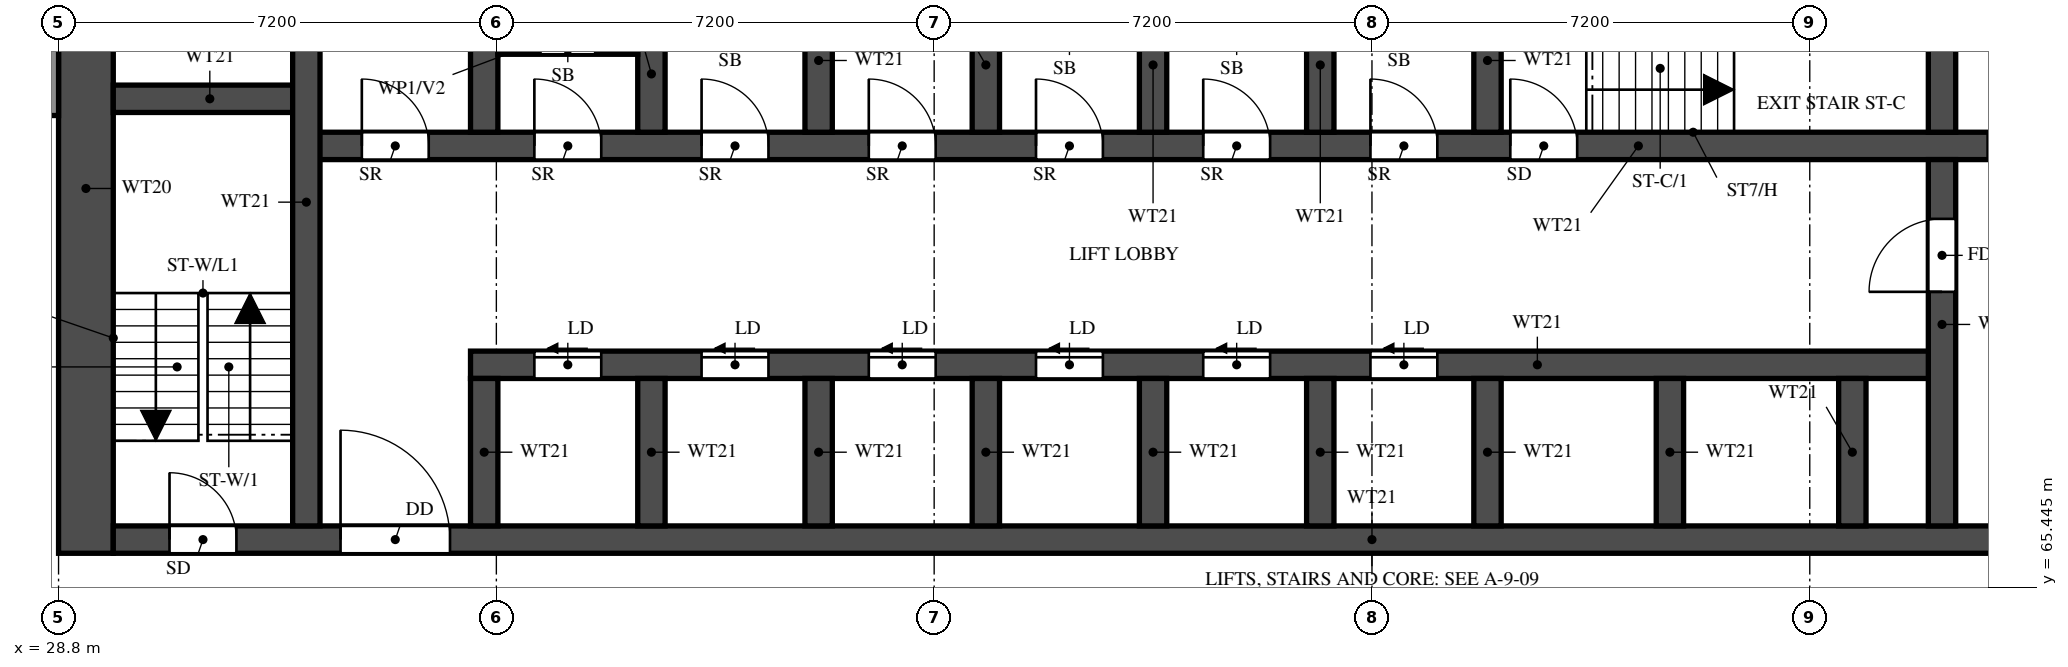
"""IFC4 building model, lengths in metres.
Left out: names, types, materials, properties, quantities, classifications, styles, units other than length and angle.
Written with IfcOpenShell. Run it as: python <this file> out.ifc"""

import sys

from ifc_helpers import new_model, si_unit, direction, frame, frame_2d, origin, place, context, subcontext, project, spatial, rectangle, extrude, element, fill, save


model = new_model("IFC4")
c1 = context("Model", 3, precision=1e-05, world=origin(), true_north=direction((0.0, 1.0)))
c2 = subcontext(c1, "Body", "Model", "MODEL_VIEW")
j1 = project(units=[si_unit("LENGTHUNIT", "METRE"), si_unit("PLANEANGLEUNIT", "RADIAN")], contexts=[c1])
p1 = place(None, origin())
s1 = spatial("IfcSite", under=j1, at=p1, CompositionType="ELEMENT")
p2 = place(p1, origin())
s2 = spatial("IfcBuilding", under=s1, at=p2, CompositionType="ELEMENT")
p3 = place(p2, frame((0.0, 0.0, 48.0)))
s3 = spatial("IfcBuildingStorey", under=s2, at=p3, CompositionType="ELEMENT", Elevation=48.0)
p4 = place(p3, frame((29.25, 66.0, 0.0), z_axis=(0.0, 0.0, 1.0), x_axis=(0.0, 1.0, 0.0)))
e1 = element("IfcWall", 1, at=p4, inside=s3, PredefinedType="SHEAR", context=c2, shape_type="SweptSolid", body=[
    extrude(rectangle(XDim=12.0, YDim=0.9, at=frame_2d((6.0, 0.0))), origin(), (0.0, 0.0, 1.0), 3.18),
])
p5 = place(p3, frame((29.7, 66.225, 0.0), z_axis=(0.0, 0.0, 1.0), x_axis=(1.0, 0.0, 0.0)))
e2 = element("IfcWall", 2, at=p5, inside=s3, PredefinedType="SHEAR", context=c2, shape_type="SweptSolid", body=[
    extrude(rectangle(XDim=41.4, YDim=0.45, at=frame_2d((20.7, 0.0))), origin(), (0.0, 0.0, 1.0), 3.18),
])
p6 = place(p5, frame((0.925, 0.0, 0.0)))
e3 = element("IfcOpeningElement", 3, at=p6, cuts=e2, PredefinedType="OPENING", context=c2, shape_type="SweptSolid", body=[
    extrude(rectangle(XDim=1.1, YDim=2.1, at=frame_2d((0.55, 1.05))), frame((0.0, 0.235, 0.0), z_axis=(0.0, -1.0, 0.0), x_axis=(1.0, 0.0, 0.0)), (0.0, 0.0, 1.0), 0.47),
])
p7 = place(p5, frame((3.738, 0.0, 0.0)))
e4 = element("IfcOpeningElement", 4, at=p7, cuts=e2, PredefinedType="OPENING", context=c2, shape_type="SweptSolid", body=[
    extrude(rectangle(XDim=1.8, YDim=2.1, at=frame_2d((0.9, 1.05))), frame((0.0, 0.235, 0.0), z_axis=(0.0, -1.0, 0.0), x_axis=(1.0, 0.0, 0.0)), (0.0, 0.0, 1.0), 0.47),
])
p8 = place(p3, frame((35.575, 69.1, 0.0), z_axis=(0.0, 0.0, 1.0), x_axis=(1.0, 0.0, 0.0)))
e5 = element("IfcWall", 5, at=p8, inside=s3, PredefinedType="SHEAR", context=c2, shape_type="SweptSolid", body=[
    extrude(rectangle(XDim=24.2, YDim=0.45, at=frame_2d((12.1, 0.0))), origin(), (0.0, 0.0, 1.0), 3.18),
])
p9 = place(p8, frame((1.05, 0.0, 0.0)))
e6 = element("IfcOpeningElement", 6, at=p9, cuts=e5, PredefinedType="OPENING", context=c2, shape_type="SweptSolid", body=[
    extrude(rectangle(XDim=1.1, YDim=2.1, at=frame_2d((0.55, 1.05))), frame((0.0, 0.235, 0.0), z_axis=(0.0, -1.0, 0.0), x_axis=(1.0, 0.0, 0.0)), (0.0, 0.0, 1.0), 0.47),
])
p10 = place(p8, frame((3.8, 0.0, 0.0)))
e7 = element("IfcOpeningElement", 7, at=p10, cuts=e5, PredefinedType="OPENING", context=c2, shape_type="SweptSolid", body=[
    extrude(rectangle(XDim=1.1, YDim=2.1, at=frame_2d((0.55, 1.05))), frame((0.0, 0.235, 0.0), z_axis=(0.0, -1.0, 0.0), x_axis=(1.0, 0.0, 0.0)), (0.0, 0.0, 1.0), 0.47),
])
p11 = place(p8, frame((6.55, 0.0, 0.0)))
e8 = element("IfcOpeningElement", 8, at=p11, cuts=e5, PredefinedType="OPENING", context=c2, shape_type="SweptSolid", body=[
    extrude(rectangle(XDim=1.1, YDim=2.1, at=frame_2d((0.55, 1.05))), frame((0.0, 0.235, 0.0), z_axis=(0.0, -1.0, 0.0), x_axis=(1.0, 0.0, 0.0)), (0.0, 0.0, 1.0), 0.47),
])
p12 = place(p8, frame((9.3, 0.0, 0.0)))
e9 = element("IfcOpeningElement", 9, at=p12, cuts=e5, PredefinedType="OPENING", context=c2, shape_type="SweptSolid", body=[
    extrude(rectangle(XDim=1.1, YDim=2.1, at=frame_2d((0.55, 1.05))), frame((0.0, 0.235, 0.0), z_axis=(0.0, -1.0, 0.0), x_axis=(1.0, 0.0, 0.0)), (0.0, 0.0, 1.0), 0.47),
])
p13 = place(p8, frame((12.05, 0.0, 0.0)))
e10 = element("IfcOpeningElement", 10, at=p13, cuts=e5, PredefinedType="OPENING", context=c2, shape_type="SweptSolid", body=[
    extrude(rectangle(XDim=1.1, YDim=2.1, at=frame_2d((0.55, 1.05))), frame((0.0, 0.235, 0.0), z_axis=(0.0, -1.0, 0.0), x_axis=(1.0, 0.0, 0.0)), (0.0, 0.0, 1.0), 0.47),
])
p14 = place(p8, frame((14.8, 0.0, 0.0)))
e11 = element("IfcOpeningElement", 11, at=p14, cuts=e5, PredefinedType="OPENING", context=c2, shape_type="SweptSolid", body=[
    extrude(rectangle(XDim=1.1, YDim=2.1, at=frame_2d((0.55, 1.05))), frame((0.0, 0.235, 0.0), z_axis=(0.0, -1.0, 0.0), x_axis=(1.0, 0.0, 0.0)), (0.0, 0.0, 1.0), 0.47),
])
p15 = place(p3, frame((32.875, 72.7, 0.0), z_axis=(0.0, 0.0, 1.0), x_axis=(1.0, 0.0, 0.0)))
e12 = element("IfcWall", 12, at=p15, inside=s3, PredefinedType="SHEAR", context=c2, shape_type="SweptSolid", body=[
    extrude(rectangle(XDim=35.05, YDim=0.45, at=frame_2d((17.525, 0.0))), origin(), (0.0, 0.0, 1.0), 3.18),
])
p16 = place(p15, frame((19.8, 0.0, 0.0)))
e13 = element("IfcOpeningElement", 13, at=p16, cuts=e12, PredefinedType="OPENING", context=c2, shape_type="SweptSolid", body=[
    extrude(rectangle(XDim=1.1, YDim=2.1, at=frame_2d((0.55, 1.05))), frame((0.0, 0.235, 0.0), z_axis=(0.0, -1.0, 0.0), x_axis=(1.0, 0.0, 0.0)), (0.0, 0.0, 1.0), 0.47),
])
p17 = place(p15, frame((27.65, 0.0, 0.0)))
e14 = element("IfcOpeningElement", 14, at=p17, cuts=e12, PredefinedType="OPENING", context=c2, shape_type="SweptSolid", body=[
    extrude(rectangle(XDim=1.1, YDim=2.1, at=frame_2d((0.55, 1.05))), frame((0.0, 0.235, 0.0), z_axis=(0.0, -1.0, 0.0), x_axis=(1.0, 0.0, 0.0)), (0.0, 0.0, 1.0), 0.47),
])
p18 = place(p15, frame((30.25, 0.0, 0.0)))
e15 = element("IfcOpeningElement", 15, at=p18, cuts=e12, PredefinedType="OPENING", context=c2, shape_type="SweptSolid", body=[
    extrude(rectangle(XDim=1.1, YDim=2.1, at=frame_2d((0.55, 1.05))), frame((0.0, 0.235, 0.0), z_axis=(0.0, -1.0, 0.0), x_axis=(1.0, 0.0, 0.0)), (0.0, 0.0, 1.0), 0.47),
])
p19 = place(p15, frame((3.75, 0.0, 0.0)))
e16 = element("IfcOpeningElement", 16, at=p19, cuts=e12, PredefinedType="OPENING", context=c2, shape_type="SweptSolid", body=[
    extrude(rectangle(XDim=1.1, YDim=2.1, at=frame_2d((0.55, 1.05))), frame((0.0, 0.235, 0.0), z_axis=(0.0, -1.0, 0.0), x_axis=(1.0, 0.0, 0.0)), (0.0, 0.0, 1.0), 0.47),
])
p20 = place(p15, frame((6.5, 0.0, 0.0)))
e17 = element("IfcOpeningElement", 17, at=p20, cuts=e12, PredefinedType="OPENING", context=c2, shape_type="SweptSolid", body=[
    extrude(rectangle(XDim=1.1, YDim=2.1, at=frame_2d((0.55, 1.05))), frame((0.0, 0.235, 0.0), z_axis=(0.0, -1.0, 0.0), x_axis=(1.0, 0.0, 0.0)), (0.0, 0.0, 1.0), 0.47),
])
p21 = place(p15, frame((9.25, 0.0, 0.0)))
e18 = element("IfcOpeningElement", 18, at=p21, cuts=e12, PredefinedType="OPENING", context=c2, shape_type="SweptSolid", body=[
    extrude(rectangle(XDim=1.1, YDim=2.1, at=frame_2d((0.55, 1.05))), frame((0.0, 0.235, 0.0), z_axis=(0.0, -1.0, 0.0), x_axis=(1.0, 0.0, 0.0)), (0.0, 0.0, 1.0), 0.47),
])
p22 = place(p15, frame((12.0, 0.0, 0.0)))
e19 = element("IfcOpeningElement", 19, at=p22, cuts=e12, PredefinedType="OPENING", context=c2, shape_type="SweptSolid", body=[
    extrude(rectangle(XDim=1.1, YDim=2.1, at=frame_2d((0.55, 1.05))), frame((0.0, 0.235, 0.0), z_axis=(0.0, -1.0, 0.0), x_axis=(1.0, 0.0, 0.0)), (0.0, 0.0, 1.0), 0.47),
])
p23 = place(p15, frame((14.75, 0.0, 0.0)))
e20 = element("IfcOpeningElement", 20, at=p23, cuts=e12, PredefinedType="OPENING", context=c2, shape_type="SweptSolid", body=[
    extrude(rectangle(XDim=1.1, YDim=2.1, at=frame_2d((0.55, 1.05))), frame((0.0, 0.235, 0.0), z_axis=(0.0, -1.0, 0.0), x_axis=(1.0, 0.0, 0.0)), (0.0, 0.0, 1.0), 0.47),
])
p24 = place(p15, frame((17.5, 0.0, 0.0)))
e21 = element("IfcOpeningElement", 21, at=p24, cuts=e12, PredefinedType="OPENING", context=c2, shape_type="SweptSolid", body=[
    extrude(rectangle(XDim=1.1, YDim=2.1, at=frame_2d((0.55, 1.05))), frame((0.0, 0.235, 0.0), z_axis=(0.0, -1.0, 0.0), x_axis=(1.0, 0.0, 0.0)), (0.0, 0.0, 1.0), 0.47),
])
p25 = place(p15, frame((0.913, 0.0, 0.0)))
e22 = element("IfcOpeningElement", 22, at=p25, cuts=e12, PredefinedType="OPENING", context=c2, shape_type="SweptSolid", body=[
    extrude(rectangle(XDim=1.1, YDim=2.1, at=frame_2d((0.55, 1.05))), frame((0.0, 0.235, 0.0), z_axis=(0.0, -1.0, 0.0), x_axis=(1.0, 0.0, 0.0)), (0.0, 0.0, 1.0), 0.47),
])
p26 = place(p3, frame((29.7, 73.475, 0.0), z_axis=(0.0, 0.0, 1.0), x_axis=(1.0, 0.0, 0.0)))
e23 = element("IfcWall", 23, at=p26, inside=s3, PredefinedType="SHEAR", context=c2, shape_type="SweptSolid", body=[
    extrude(rectangle(XDim=3.175, YDim=0.45, at=frame_2d((1.587, 0.0))), origin(), (0.0, 0.0, 1.0), 3.18),
])
p27 = place(p3, frame((32.875, 66.45, 0.0), z_axis=(0.0, 0.0, 1.0), x_axis=(0.0, 1.0, 0.0)))
e24 = element("IfcWall", 24, at=p27, inside=s3, PredefinedType="SHEAR", context=c2, shape_type="SweptSolid", body=[
    extrude(rectangle(XDim=10.65, YDim=0.45, at=frame_2d((5.325, 0.0))), origin(), (0.0, 0.0, 1.0), 3.18),
])
p28 = place(p3, frame((59.775, 66.45, 0.0), z_axis=(0.0, 0.0, 1.0), x_axis=(0.0, 1.0, 0.0)))
e25 = element("IfcWall", 25, at=p28, inside=s3, PredefinedType="SHEAR", context=c2, shape_type="SweptSolid", body=[
    extrude(rectangle(XDim=6.025, YDim=0.45, at=frame_2d((3.013, 0.0))), origin(), (0.0, 0.0, 1.0), 3.18),
])
p29 = place(p28, frame((3.85, 0.0, 0.0)))
e26 = element("IfcOpeningElement", 26, at=p29, cuts=e25, PredefinedType="OPENING", context=c2, shape_type="SweptSolid", body=[
    extrude(rectangle(XDim=1.2, YDim=2.1, at=frame_2d((0.6, 1.05))), frame((0.0, 0.235, 0.0), z_axis=(0.0, -1.0, 0.0), x_axis=(1.0, 0.0, 0.0)), (0.0, 0.0, 1.0), 0.47),
])
p30 = place(p3, frame((59.775, 72.925, 0.0), z_axis=(0.0, 0.0, 1.0), x_axis=(0.0, 1.0, 0.0)))
e27 = element("IfcWall", 27, at=p30, inside=s3, PredefinedType="SHEAR", context=c2, shape_type="SweptSolid", body=[
    extrude(rectangle(XDim=2.95, YDim=0.45, at=frame_2d((1.475, 0.0))), origin(), (0.0, 0.0, 1.0), 3.18),
])
for number, where, z_axis, x_axis in (
    (28, (35.8, 66.45, 0.0), (0.0, 0.0, 1.0), (0.0, 1.0, 0.0)),
    (29, (38.55, 66.45, 0.0), (0.0, 0.0, 1.0), (0.0, 1.0, 0.0)),
    (30, (41.3, 66.45, 0.0), (0.0, 0.0, 1.0), (0.0, 1.0, 0.0)),
    (31, (44.05, 66.45, 0.0), (0.0, 0.0, 1.0), (0.0, 1.0, 0.0)),
    (32, (46.8, 66.45, 0.0), (0.0, 0.0, 1.0), (0.0, 1.0, 0.0)),
    (33, (49.55, 66.45, 0.0), (0.0, 0.0, 1.0), (0.0, 1.0, 0.0)),
    (34, (52.3, 66.45, 0.0), (0.0, 0.0, 1.0), (0.0, 1.0, 0.0)),
    (35, (55.3, 66.45, 0.0), (0.0, 0.0, 1.0), (0.0, 1.0, 0.0)),
    (36, (58.3, 66.45, 0.0), (0.0, 0.0, 1.0), (0.0, 1.0, 0.0)),
):
    element("IfcWall", number, at=place(p3, frame(where, z_axis=z_axis, x_axis=x_axis)), inside=s3, PredefinedType="SHEAR", context=c2, shape_type="SweptSolid", body=[
        extrude(rectangle(XDim=2.425, YDim=0.45, at=frame_2d((1.212, 0.0))), origin(), (0.0, 0.0, 1.0), 3.18),
    ])
for number, where, z_axis, x_axis in (
    (37, (35.8, 72.925, 0.0), (0.0, 0.0, 1.0), (0.0, 1.0, 0.0)),
    (38, (38.55, 72.925, 0.0), (0.0, 0.0, 1.0), (0.0, 1.0, 0.0)),
    (39, (41.3, 72.925, 0.0), (0.0, 0.0, 1.0), (0.0, 1.0, 0.0)),
    (40, (44.05, 72.925, 0.0), (0.0, 0.0, 1.0), (0.0, 1.0, 0.0)),
    (41, (46.8, 72.925, 0.0), (0.0, 0.0, 1.0), (0.0, 1.0, 0.0)),
    (42, (49.55, 72.925, 0.0), (0.0, 0.0, 1.0), (0.0, 1.0, 0.0)),
    (43, (52.3, 72.925, 0.0), (0.0, 0.0, 1.0), (0.0, 1.0, 0.0)),
):
    element("IfcWall", number, at=place(p3, frame(where, z_axis=z_axis, x_axis=x_axis)), inside=s3, PredefinedType="SHEAR", context=c2, shape_type="SweptSolid", body=[
        extrude(rectangle(XDim=2.95, YDim=0.45, at=frame_2d((1.475, 0.0))), origin(), (0.0, 0.0, 1.0), 3.18),
    ])
p31 = place(p3, frame((36.025, 74.282, 0.0), z_axis=(0.0, 0.0, 1.0), x_axis=(1.0, 0.0, 0.0)))
e44 = element("IfcWall", 44, at=p31, inside=s3, PredefinedType="PARTITIONING", context=c2, shape_type="SweptSolid", body=[
    extrude(rectangle(XDim=2.3, YDim=0.15, at=frame_2d((1.15, 0.0))), origin(), (0.0, 0.0, 1.0), 3.18),
])
p32 = place(p31, frame((0.7, 0.0, 0.0)))
e45 = element("IfcOpeningElement", 45, at=p32, cuts=e44, PredefinedType="OPENING", context=c2, shape_type="SweptSolid", body=[
    extrude(rectangle(XDim=0.9, YDim=2.1, at=frame_2d((0.45, 1.05))), frame((0.0, 0.085, 0.0), z_axis=(0.0, -1.0, 0.0), x_axis=(1.0, 0.0, 0.0)), (0.0, 0.0, 1.0), 0.17),
])
p33 = place(p3, frame((28.7, 73.2, 0.0), z_axis=(0.0, 0.0, 1.0), x_axis=(0.0, 1.0, 0.0)))
e46 = element("IfcWall", 46, at=p33, inside=s3, PredefinedType="SOLIDWALL", context=c2, shape_type="SweptSolid", body=[
    extrude(rectangle(XDim=4.8, YDim=0.2, at=frame_2d((2.4, 0.0))), origin(), (0.0, 0.0, 1.0), 3.18),
])
p34 = place(p6, origin())
e47 = element("IfcDoor", 47, at=p34, inside=s3, OperationType="SINGLE_SWING_LEFT", PredefinedType="DOOR", context=c2, shape_type="SweptSolid", body=[
    extrude(rectangle(XDim=1.1, YDim=2.1, at=frame_2d((0.55, 1.05))), frame((0.0, 0.025, 0.0), z_axis=(0.0, -1.0, 0.0), x_axis=(1.0, 0.0, 0.0)), (0.0, 0.0, 1.0), 0.05),
])
fill(e3, e47)
p35 = place(p16, origin())
e48 = element("IfcDoor", 48, at=p35, inside=s3, OperationType="SINGLE_SWING_LEFT", PredefinedType="DOOR", context=c2, shape_type="SweptSolid", body=[
    extrude(rectangle(XDim=1.1, YDim=2.1, at=frame_2d((0.55, 1.05))), frame((0.0, 0.025, 0.0), z_axis=(0.0, -1.0, 0.0), x_axis=(1.0, 0.0, 0.0)), (0.0, 0.0, 1.0), 0.05),
])
fill(e13, e48)
p36 = place(p7, origin())
e49 = element("IfcDoor", 49, at=p36, inside=s3, OperationType="DOUBLE_DOOR_SINGLE_SWING", PredefinedType="DOOR", context=c2, shape_type="SweptSolid", body=[
    extrude(rectangle(XDim=1.8, YDim=2.1, at=frame_2d((0.9, 1.05))), frame((0.0, 0.025, 0.0), z_axis=(0.0, -1.0, 0.0), x_axis=(1.0, 0.0, 0.0)), (0.0, 0.0, 1.0), 0.05),
])
fill(e4, e49)
p37 = place(p29, origin())
e50 = element("IfcDoor", 50, at=p37, inside=s3, OperationType="SINGLE_SWING_RIGHT", PredefinedType="DOOR", context=c2, shape_type="SweptSolid", body=[
    extrude(rectangle(XDim=1.2, YDim=2.1, at=frame_2d((0.6, 1.05))), frame((0.0, 0.025, 0.0), z_axis=(0.0, -1.0, 0.0), x_axis=(1.0, 0.0, 0.0)), (0.0, 0.0, 1.0), 0.05),
])
fill(e26, e50)
p38 = place(p17, origin())
e51 = element("IfcDoor", 51, at=p38, inside=s3, OperationType="SLIDING_TO_LEFT", PredefinedType="DOOR", context=c2, shape_type="SweptSolid", body=[
    extrude(rectangle(XDim=1.1, YDim=2.1, at=frame_2d((0.55, 1.05))), frame((0.0, 0.025, 0.0), z_axis=(0.0, -1.0, 0.0), x_axis=(1.0, 0.0, 0.0)), (0.0, 0.0, 1.0), 0.05),
])
fill(e14, e51)
p39 = place(p9, origin())
e52 = element("IfcDoor", 52, at=p39, inside=s3, OperationType="SLIDING_TO_LEFT", PredefinedType="DOOR", context=c2, shape_type="SweptSolid", body=[
    extrude(rectangle(XDim=1.1, YDim=2.1, at=frame_2d((0.55, 1.05))), frame((0.0, 0.025, 0.0), z_axis=(0.0, -1.0, 0.0), x_axis=(1.0, 0.0, 0.0)), (0.0, 0.0, 1.0), 0.05),
])
fill(e6, e52)
p40 = place(p10, origin())
e53 = element("IfcDoor", 53, at=p40, inside=s3, OperationType="SLIDING_TO_LEFT", PredefinedType="DOOR", context=c2, shape_type="SweptSolid", body=[
    extrude(rectangle(XDim=1.1, YDim=2.1, at=frame_2d((0.55, 1.05))), frame((0.0, 0.025, 0.0), z_axis=(0.0, -1.0, 0.0), x_axis=(1.0, 0.0, 0.0)), (0.0, 0.0, 1.0), 0.05),
])
fill(e7, e53)
p41 = place(p11, origin())
e54 = element("IfcDoor", 54, at=p41, inside=s3, OperationType="SLIDING_TO_LEFT", PredefinedType="DOOR", context=c2, shape_type="SweptSolid", body=[
    extrude(rectangle(XDim=1.1, YDim=2.1, at=frame_2d((0.55, 1.05))), frame((0.0, 0.025, 0.0), z_axis=(0.0, -1.0, 0.0), x_axis=(1.0, 0.0, 0.0)), (0.0, 0.0, 1.0), 0.05),
])
fill(e8, e54)
p42 = place(p12, origin())
e55 = element("IfcDoor", 55, at=p42, inside=s3, OperationType="SLIDING_TO_LEFT", PredefinedType="DOOR", context=c2, shape_type="SweptSolid", body=[
    extrude(rectangle(XDim=1.1, YDim=2.1, at=frame_2d((0.55, 1.05))), frame((0.0, 0.025, 0.0), z_axis=(0.0, -1.0, 0.0), x_axis=(1.0, 0.0, 0.0)), (0.0, 0.0, 1.0), 0.05),
])
fill(e9, e55)
p43 = place(p13, origin())
e56 = element("IfcDoor", 56, at=p43, inside=s3, OperationType="SLIDING_TO_LEFT", PredefinedType="DOOR", context=c2, shape_type="SweptSolid", body=[
    extrude(rectangle(XDim=1.1, YDim=2.1, at=frame_2d((0.55, 1.05))), frame((0.0, 0.025, 0.0), z_axis=(0.0, -1.0, 0.0), x_axis=(1.0, 0.0, 0.0)), (0.0, 0.0, 1.0), 0.05),
])
fill(e10, e56)
p44 = place(p14, origin())
e57 = element("IfcDoor", 57, at=p44, inside=s3, OperationType="SLIDING_TO_LEFT", PredefinedType="DOOR", context=c2, shape_type="SweptSolid", body=[
    extrude(rectangle(XDim=1.1, YDim=2.1, at=frame_2d((0.55, 1.05))), frame((0.0, 0.025, 0.0), z_axis=(0.0, -1.0, 0.0), x_axis=(1.0, 0.0, 0.0)), (0.0, 0.0, 1.0), 0.05),
])
fill(e11, e57)
p45 = place(p19, origin())
e58 = element("IfcDoor", 58, at=p45, inside=s3, OperationType="SINGLE_SWING_LEFT", PredefinedType="DOOR", context=c2, shape_type="SweptSolid", body=[
    extrude(rectangle(XDim=1.1, YDim=2.1, at=frame_2d((0.55, 1.05))), frame((0.0, 0.025, 0.0), z_axis=(0.0, -1.0, 0.0), x_axis=(1.0, 0.0, 0.0)), (0.0, 0.0, 1.0), 0.05),
])
fill(e16, e58)
p46 = place(p20, origin())
e59 = element("IfcDoor", 59, at=p46, inside=s3, OperationType="SINGLE_SWING_LEFT", PredefinedType="DOOR", context=c2, shape_type="SweptSolid", body=[
    extrude(rectangle(XDim=1.1, YDim=2.1, at=frame_2d((0.55, 1.05))), frame((0.0, 0.025, 0.0), z_axis=(0.0, -1.0, 0.0), x_axis=(1.0, 0.0, 0.0)), (0.0, 0.0, 1.0), 0.05),
])
fill(e17, e59)
p47 = place(p21, origin())
e60 = element("IfcDoor", 60, at=p47, inside=s3, OperationType="SINGLE_SWING_LEFT", PredefinedType="DOOR", context=c2, shape_type="SweptSolid", body=[
    extrude(rectangle(XDim=1.1, YDim=2.1, at=frame_2d((0.55, 1.05))), frame((0.0, 0.025, 0.0), z_axis=(0.0, -1.0, 0.0), x_axis=(1.0, 0.0, 0.0)), (0.0, 0.0, 1.0), 0.05),
])
fill(e18, e60)
p48 = place(p22, origin())
e61 = element("IfcDoor", 61, at=p48, inside=s3, OperationType="SINGLE_SWING_LEFT", PredefinedType="DOOR", context=c2, shape_type="SweptSolid", body=[
    extrude(rectangle(XDim=1.1, YDim=2.1, at=frame_2d((0.55, 1.05))), frame((0.0, 0.025, 0.0), z_axis=(0.0, -1.0, 0.0), x_axis=(1.0, 0.0, 0.0)), (0.0, 0.0, 1.0), 0.05),
])
fill(e19, e61)
p49 = place(p23, origin())
e62 = element("IfcDoor", 62, at=p49, inside=s3, OperationType="SINGLE_SWING_LEFT", PredefinedType="DOOR", context=c2, shape_type="SweptSolid", body=[
    extrude(rectangle(XDim=1.1, YDim=2.1, at=frame_2d((0.55, 1.05))), frame((0.0, 0.025, 0.0), z_axis=(0.0, -1.0, 0.0), x_axis=(1.0, 0.0, 0.0)), (0.0, 0.0, 1.0), 0.05),
])
fill(e20, e62)
p50 = place(p24, origin())
e63 = element("IfcDoor", 63, at=p50, inside=s3, OperationType="SINGLE_SWING_LEFT", PredefinedType="DOOR", context=c2, shape_type="SweptSolid", body=[
    extrude(rectangle(XDim=1.1, YDim=2.1, at=frame_2d((0.55, 1.05))), frame((0.0, 0.025, 0.0), z_axis=(0.0, -1.0, 0.0), x_axis=(1.0, 0.0, 0.0)), (0.0, 0.0, 1.0), 0.05),
])
fill(e21, e63)
p51 = place(p25, origin())
e64 = element("IfcDoor", 64, at=p51, inside=s3, OperationType="SINGLE_SWING_LEFT", PredefinedType="DOOR", context=c2, shape_type="SweptSolid", body=[
    extrude(rectangle(XDim=1.1, YDim=2.1, at=frame_2d((0.55, 1.05))), frame((0.0, 0.025, 0.0), z_axis=(0.0, -1.0, 0.0), x_axis=(1.0, 0.0, 0.0)), (0.0, 0.0, 1.0), 0.05),
])
fill(e22, e64)
save(model, sys.argv[1])
